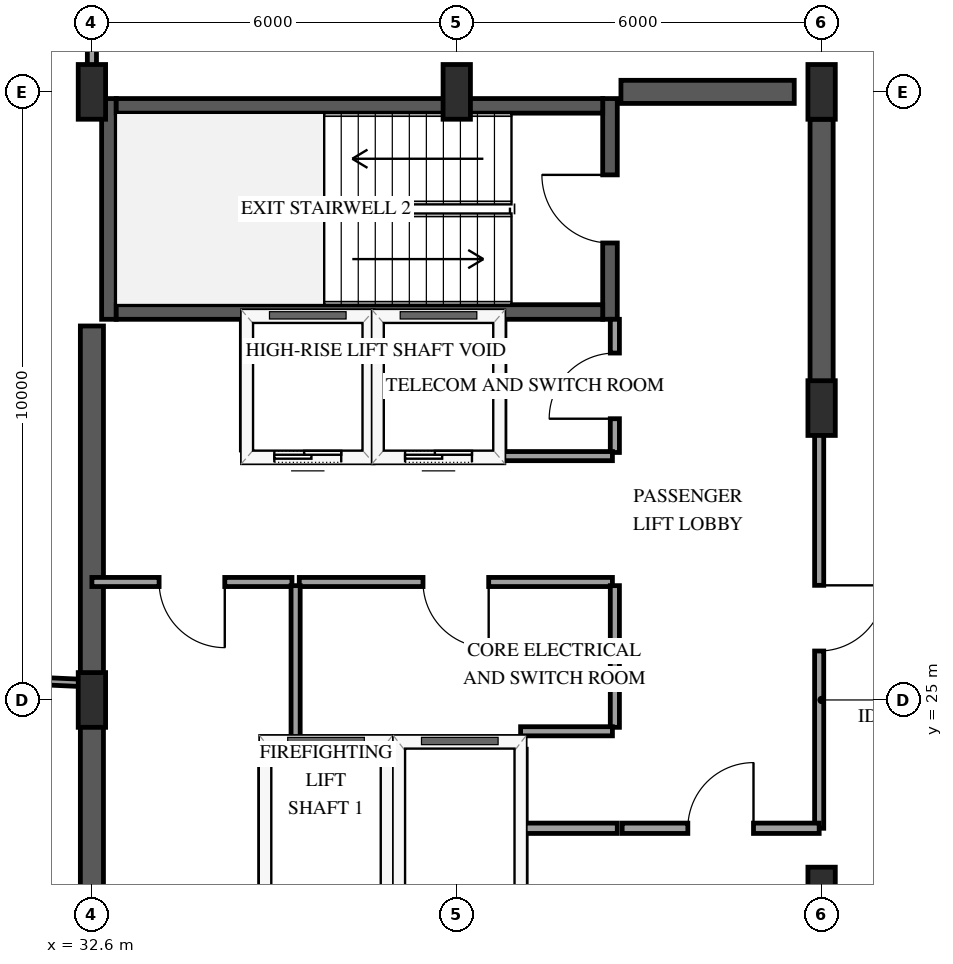
"""IFC4 building model, lengths in metres.
Left out: names, types, materials, properties, quantities, classifications, styles, units other than length and angle.
Written with IfcOpenShell. Run it as: python <this file> out.ifc"""

import sys

from ifc_helpers import new_model, si_unit, direction, frame, frame_2d, origin, origin_2d, place, context, subcontext, project, spatial, rectangle, extrude, element, fill, save


model = new_model("IFC4")
c1 = context("Model", 3, precision=1e-05, world=origin(), true_north=direction((0.0, 1.0)))
c2 = subcontext(c1, "Body", "Model", "MODEL_VIEW")
j1 = project(units=[si_unit("LENGTHUNIT", "METRE"), si_unit("PLANEANGLEUNIT", "RADIAN")], contexts=[c1])
p1 = place(None, origin())
s1 = spatial("IfcSite", under=j1, at=p1, CompositionType="ELEMENT")
p2 = place(p1, origin())
s2 = spatial("IfcBuilding", under=s1, at=p2, CompositionType="ELEMENT")
p3 = place(p2, frame((0.0, 0.0, 293.05)))
s3 = spatial("IfcBuildingStorey", under=s2, at=p3, CompositionType="ELEMENT", Elevation=293.05)
p4 = place(p3, frame((32.88, 31.26, 0.0), z_axis=(0.0, 0.0, 1.0), x_axis=(0.0, 1.0, 0.0)))
e1 = element("IfcWall", 1, at=p4, inside=s3, PredefinedType="SHEAR", context=c2, shape_type="SweptSolid", body=[
    extrude(rectangle(XDim=3.63, YDim=0.24, at=frame_2d((1.815, 0.0))), origin(), (0.0, 0.0, 1.0), 4.2),
])
p5 = place(p3, frame((41.12, 31.26, 0.0), z_axis=(0.0, 0.0, 1.0), x_axis=(0.0, 1.0, 0.0)))
e2 = element("IfcWall", 2, at=p5, inside=s3, PredefinedType="SHEAR", context=c2, shape_type="SweptSolid", body=[
    extrude(rectangle(XDim=3.63, YDim=0.24, at=frame_2d((1.815, 0.0))), origin(), (0.0, 0.0, 1.0), 4.2),
])
p6 = place(p5, frame((1.255, 0.0, 0.0)))
e3 = element("IfcOpeningElement", 3, at=p6, cuts=e2, PredefinedType="OPENING", context=c2, shape_type="SweptSolid", body=[
    extrude(rectangle(XDim=1.12, YDim=2.15, at=frame_2d((0.56, 1.075))), frame((0.0, 0.13, 0.0), z_axis=(0.0, -1.0, 0.0), x_axis=(1.0, 0.0, 0.0)), (0.0, 0.0, 1.0), 0.26),
])
for number, where, z_axis, x_axis in (
    (4, (33.0, 31.38, 0.0), (0.0, 0.0, 1.0), (1.0, 0.0, 0.0)),
    (5, (33.0, 34.77, 0.0), (0.0, 0.0, 1.0), (1.0, 0.0, 0.0)),
):
    element("IfcWall", number, at=place(p3, frame(where, z_axis=z_axis, x_axis=x_axis)), inside=s3, PredefinedType="SHEAR", context=c2, shape_type="SweptSolid", body=[
        extrude(rectangle(XDim=8.0, YDim=0.24, at=frame_2d((4.0, 0.0))), origin(), (0.0, 0.0, 1.0), 4.2),
    ])
p7 = place(p3, frame((32.6, 18.85, 0.0), z_axis=(0.0, 0.0, 1.0), x_axis=(0.0, 1.0, 0.0)))
e6 = element("IfcWall", 6, at=p7, inside=s3, PredefinedType="SHEAR", context=c2, shape_type="SweptSolid", body=[
    extrude(rectangle(XDim=12.3, YDim=0.38, at=frame_2d((6.15, 0.0))), origin(), (0.0, 0.0, 1.0), 4.2),
])
p8 = place(p3, frame((41.3, 35.0, 0.0), z_axis=(0.0, 0.0, 1.0), x_axis=(1.0, 0.0, 0.0)))
e7 = element("IfcWall", 7, at=p8, inside=s3, PredefinedType="SHEAR", context=c2, shape_type="SweptSolid", body=[
    extrude(rectangle(XDim=2.85, YDim=0.38, at=frame_2d((1.425, 0.0))), origin(), (0.0, 0.0, 1.0), 4.2),
])
p9 = place(p3, frame((44.6, 29.8, 0.0), z_axis=(0.0, 0.0, 1.0), x_axis=(0.0, 1.0, 0.0)))
e8 = element("IfcWall", 8, at=p9, inside=s3, PredefinedType="SHEAR", context=c2, shape_type="SweptSolid", body=[
    extrude(rectangle(XDim=4.75, YDim=0.38, at=frame_2d((2.375, 0.0))), origin(), (0.0, 0.0, 1.0), 4.2),
])
for number, where, z_axis, x_axis in (
    (9, (32.6, 25.0, -0.305), (0.0, 0.0, 1.0), (1.0, 0.0, 0.0)),
    (10, (32.6, 35.0, -0.305), (0.0, 0.0, 1.0), (1.0, 0.0, 0.0)),
    (11, (38.6, 35.0, -0.305), (0.0, 0.0, 1.0), (1.0, 0.0, 0.0)),
    (12, (44.6, 21.8, -0.305), (0.0, 0.0, 1.0), (1.0, 0.0, 0.0)),
    (13, (44.6, 29.8, -0.305), (0.0, 0.0, 1.0), (1.0, 0.0, 0.0)),
    (14, (44.6, 35.0, -0.305), (0.0, 0.0, 1.0), (1.0, 0.0, 0.0)),
):
    element("IfcColumn", number, at=place(p3, frame(where, z_axis=z_axis, x_axis=x_axis)), inside=s3, PredefinedType="PILASTER", context=c2, shape_type="SweptSolid", body=[
        extrude(rectangle(XDim=0.45, YDim=0.9, at=origin_2d()), origin(), (0.0, 0.0, 1.0), 4.505),
    ])
p10 = place(p3, frame((35.45, 24.3, 0.0), z_axis=(0.0, 0.0, 1.0), x_axis=(1.0, 0.0, 0.0)))
e15 = element("IfcWall", 15, at=p10, inside=s3, PredefinedType="SOLIDWALL", context=c2, shape_type="SweptSolid", body=[
    extrude(rectangle(XDim=2.0, YDim=0.185, at=frame_2d((1.0, 0.0))), origin(), (0.0, 0.0, 1.0), 3.895),
])
for number, where, z_axis, x_axis in (
    (16, (35.45, 21.81, 0.0), (0.0, 0.0, 1.0), (0.0, 1.0, 0.0)),
    (17, (37.45, 21.81, 0.0), (0.0, 0.0, 1.0), (0.0, 1.0, 0.0)),
):
    element("IfcWall", number, at=place(p3, frame(where, z_axis=z_axis, x_axis=x_axis)), inside=s3, PredefinedType="SOLIDWALL", context=c2, shape_type="SweptSolid", body=[
        extrude(rectangle(XDim=2.38, YDim=0.185, at=frame_2d((1.19, 0.0))), origin(), (0.0, 0.0, 1.0), 3.895),
    ])
p11 = place(p3, frame((37.65, 24.3, 0.0), z_axis=(0.0, 0.0, 1.0), x_axis=(1.0, 0.0, 0.0)))
e18 = element("IfcWall", 18, at=p11, inside=s3, PredefinedType="SOLIDWALL", context=c2, shape_type="SweptSolid", body=[
    extrude(rectangle(XDim=2.0, YDim=0.185, at=frame_2d((1.0, 0.0))), origin(), (0.0, 0.0, 1.0), 3.895),
])
p12 = place(p3, frame((39.65, 21.81, 0.0), z_axis=(0.0, 0.0, 1.0), x_axis=(0.0, 1.0, 0.0)))
e19 = element("IfcWall", 19, at=p12, inside=s3, PredefinedType="SOLIDWALL", context=c2, shape_type="SweptSolid", body=[
    extrude(rectangle(XDim=2.38, YDim=0.185, at=frame_2d((1.19, 0.0))), origin(), (0.0, 0.0, 1.0), 3.895),
])
p13 = place(p3, frame((35.15, 29.0, 0.0), z_axis=(0.0, 0.0, 1.0), x_axis=(1.0, 0.0, 0.0)))
e20 = element("IfcWall", 20, at=p13, inside=s3, PredefinedType="SOLIDWALL", context=c2, shape_type="SweptSolid", body=[
    extrude(rectangle(XDim=2.0, YDim=0.185, at=frame_2d((1.0, 0.0))), origin(), (0.0, 0.0, 1.0), 3.895),
])
p14 = place(p13, frame((0.45, 0.0, 0.0)))
e21 = element("IfcOpeningElement", 21, at=p14, cuts=e20, PredefinedType="OPENING", context=c2, shape_type="SweptSolid", body=[
    extrude(rectangle(XDim=1.1, YDim=2.15, at=frame_2d((0.55, 1.075))), frame((0.0, 0.103, 0.0), z_axis=(0.0, -1.0, 0.0), x_axis=(1.0, 0.0, 0.0)), (0.0, 0.0, 1.0), 0.205),
])
for number, where, z_axis, x_axis in (
    (22, (35.15, 29.11, 0.0), (0.0, 0.0, 1.0), (0.0, 1.0, 0.0)),
    (23, (37.15, 29.11, 0.0), (0.0, 0.0, 1.0), (0.0, 1.0, 0.0)),
):
    element("IfcWall", number, at=place(p3, frame(where, z_axis=z_axis, x_axis=x_axis)), inside=s3, PredefinedType="SOLIDWALL", context=c2, shape_type="SweptSolid", body=[
        extrude(rectangle(XDim=2.1, YDim=0.185, at=frame_2d((1.05, 0.0))), origin(), (0.0, 0.0, 1.0), 3.895),
    ])
p15 = place(p3, frame((37.3, 29.0, 0.0), z_axis=(0.0, 0.0, 1.0), x_axis=(1.0, 0.0, 0.0)))
e24 = element("IfcWall", 24, at=p15, inside=s3, PredefinedType="SOLIDWALL", context=c2, shape_type="SweptSolid", body=[
    extrude(rectangle(XDim=2.0, YDim=0.185, at=frame_2d((1.0, 0.0))), origin(), (0.0, 0.0, 1.0), 3.895),
])
p16 = place(p15, frame((0.45, 0.0, 0.0)))
e25 = element("IfcOpeningElement", 25, at=p16, cuts=e24, PredefinedType="OPENING", context=c2, shape_type="SweptSolid", body=[
    extrude(rectangle(XDim=1.1, YDim=2.15, at=frame_2d((0.55, 1.075))), frame((0.0, 0.103, 0.0), z_axis=(0.0, -1.0, 0.0), x_axis=(1.0, 0.0, 0.0)), (0.0, 0.0, 1.0), 0.205),
])
p17 = place(p3, frame((39.3, 29.11, 0.0), z_axis=(0.0, 0.0, 1.0), x_axis=(0.0, 1.0, 0.0)))
e26 = element("IfcWall", 26, at=p17, inside=s3, PredefinedType="SOLIDWALL", context=c2, shape_type="SweptSolid", body=[
    extrude(rectangle(XDim=2.1, YDim=0.185, at=frame_2d((1.05, 0.0))), origin(), (0.0, 0.0, 1.0), 3.895),
])
p18 = place(p3, frame((32.527, 25.276, 0.0), z_axis=(0.0, 0.0, 1.0), x_axis=(-0.998965703411, 0.045470027593, 0.0)))
e27 = element("IfcWall", 27, at=p18, inside=s3, PredefinedType="PARTITIONING", context=c2, shape_type="SweptSolid", body=[
    extrude(rectangle(XDim=7.458, YDim=0.12, at=frame_2d((3.729, 0.0))), origin(), (0.0, 0.0, 1.0), 3.19),
])
p19 = place(p3, frame((44.56, 29.8, 0.0), z_axis=(0.0, 0.0, 1.0), x_axis=(0.0, -1.0, 0.0)))
e28 = element("IfcWall", 28, at=p19, inside=s3, PredefinedType="PARTITIONING", context=c2, shape_type="SweptSolid", body=[
    extrude(rectangle(XDim=6.91, YDim=0.15, at=frame_2d((3.455, 0.0))), origin(), (0.0, 0.0, 1.0), 2.935),
])
p20 = place(p19, frame((2.915, 0.0, 0.0)))
e29 = element("IfcOpeningElement", 29, at=p20, cuts=e28, PredefinedType="OPENING", context=c2, shape_type="SweptSolid", body=[
    extrude(rectangle(XDim=1.08, YDim=2.15, at=frame_2d((0.54, 1.075))), frame((0.0, 0.085, 0.0), z_axis=(0.0, -1.0, 0.0), x_axis=(1.0, 0.0, 0.0)), (0.0, 0.0, 1.0), 0.17),
])
p21 = place(p3, frame((41.16, 26.94, 0.0), z_axis=(0.0, 0.0, 1.0), x_axis=(-1.0, 0.0, 0.0)))
e30 = element("IfcWall", 30, at=p21, inside=s3, PredefinedType="PARTITIONING", context=c2, shape_type="SweptSolid", body=[
    extrude(rectangle(XDim=5.15, YDim=0.15, at=frame_2d((2.575, 0.0))), origin(), (0.0, 0.0, 1.0), 3.895),
])
p22 = place(p21, frame((2.035, 0.0, 0.0)))
e31 = element("IfcOpeningElement", 31, at=p22, cuts=e30, PredefinedType="OPENING", context=c2, shape_type="SweptSolid", body=[
    extrude(rectangle(XDim=1.08, YDim=2.15, at=frame_2d((0.54, 1.075))), frame((0.0, 0.085, 0.0), z_axis=(0.0, -1.0, 0.0), x_axis=(1.0, 0.0, 0.0)), (0.0, 0.0, 1.0), 0.17),
])
p23 = place(p3, frame((35.89, 26.94, 0.0), z_axis=(0.0, 0.0, 1.0), x_axis=(-1.0, 0.0, 0.0)))
e32 = element("IfcWall", 32, at=p23, inside=s3, PredefinedType="PARTITIONING", context=c2, shape_type="SweptSolid", body=[
    extrude(rectangle(XDim=3.29, YDim=0.15, at=frame_2d((1.645, 0.0))), origin(), (0.0, 0.0, 1.0), 3.895),
])
p24 = place(p23, frame((1.105, 0.0, 0.0)))
e33 = element("IfcOpeningElement", 33, at=p24, cuts=e32, PredefinedType="OPENING", context=c2, shape_type="SweptSolid", body=[
    extrude(rectangle(XDim=1.08, YDim=2.15, at=frame_2d((0.54, 1.075))), frame((0.0, 0.085, 0.0), z_axis=(0.0, -1.0, 0.0), x_axis=(1.0, 0.0, 0.0)), (0.0, 0.0, 1.0), 0.17),
])
p25 = place(p3, frame((41.32, 22.89, 0.0), z_axis=(0.0, 0.0, 1.0), x_axis=(1.0, 0.0, 0.0)))
e34 = element("IfcWall", 34, at=p25, inside=s3, PredefinedType="PARTITIONING", context=c2, shape_type="SweptSolid", body=[
    extrude(rectangle(XDim=3.24, YDim=0.17, at=frame_2d((1.62, 0.0))), origin(), (0.0, 0.0, 1.0), 3.895),
])
p26 = place(p25, frame((1.08, 0.0, 0.0)))
e35 = element("IfcOpeningElement", 35, at=p26, cuts=e34, PredefinedType="OPENING", context=c2, shape_type="SweptSolid", body=[
    extrude(rectangle(XDim=1.08, YDim=2.15, at=frame_2d((0.54, 1.075))), frame((0.0, 0.095, 0.0), z_axis=(0.0, -1.0, 0.0), x_axis=(1.0, 0.0, 0.0)), (0.0, 0.0, 1.0), 0.19),
])
p27 = place(p3, frame((35.95, 26.88, 0.0), z_axis=(0.0, 0.0, 1.0), x_axis=(0.0, -1.0, 0.0)))
e36 = element("IfcWall", 36, at=p27, inside=s3, PredefinedType="PARTITIONING", context=c2, shape_type="SweptSolid", body=[
    extrude(rectangle(XDim=2.58, YDim=0.15, at=frame_2d((1.29, 0.0))), origin(), (0.0, 0.0, 1.0), 3.895),
])
p28 = place(p3, frame((41.2, 24.55, 0.0), z_axis=(0.0, 0.0, 1.0), x_axis=(0.0, 1.0, 0.0)))
e37 = element("IfcWall", 37, at=p28, inside=s3, PredefinedType="PARTITIONING", context=c2, shape_type="SweptSolid", body=[
    extrude(rectangle(XDim=2.33, YDim=0.15, at=frame_2d((1.165, 0.0))), origin(), (0.0, 0.0, 1.0), 3.895),
])
p29 = place(p3, frame((41.2, 29.07, 0.0), z_axis=(0.0, 0.0, 1.0), x_axis=(0.0, 1.0, 0.0)))
e38 = element("IfcWall", 38, at=p29, inside=s3, PredefinedType="PARTITIONING", context=c2, shape_type="SweptSolid", body=[
    extrude(rectangle(XDim=2.19, YDim=0.15, at=frame_2d((1.095, 0.0))), origin(), (0.0, 0.0, 1.0), 3.895),
])
p30 = place(p29, frame((0.555, 0.0, 0.0)))
e39 = element("IfcOpeningElement", 39, at=p30, cuts=e38, PredefinedType="OPENING", context=c2, shape_type="SweptSolid", body=[
    extrude(rectangle(XDim=1.08, YDim=2.15, at=frame_2d((0.54, 1.075))), frame((0.0, 0.085, 0.0), z_axis=(0.0, -1.0, 0.0), x_axis=(1.0, 0.0, 0.0)), (0.0, 0.0, 1.0), 0.17),
])
p31 = place(p3, frame((39.3, 29.01, 0.0), z_axis=(0.0, 0.0, 1.0), x_axis=(1.0, 0.0, 0.0)))
e40 = element("IfcWall", 40, at=p31, inside=s3, PredefinedType="PARTITIONING", context=c2, shape_type="SweptSolid", body=[
    extrude(rectangle(XDim=1.86, YDim=0.15, at=frame_2d((0.93, 0.0))), origin(), (0.0, 0.0, 1.0), 3.895),
])
p32 = place(p3, frame((39.72, 22.89, 0.0), z_axis=(0.0, 0.0, 1.0), x_axis=(1.0, 0.0, 0.0)))
e41 = element("IfcWall", 41, at=p32, inside=s3, PredefinedType="PARTITIONING", context=c2, shape_type="SweptSolid", body=[
    extrude(rectangle(XDim=1.52, YDim=0.17, at=frame_2d((0.76, 0.0))), origin(), (0.0, 0.0, 1.0), 3.895),
])
p33 = place(p3, frame((32.6, 35.12, 0.0), z_axis=(0.0, 0.0, 1.0), x_axis=(0.0, 1.0, 0.0)))
e42 = element("IfcWall", 42, at=p33, inside=s3, PredefinedType="PARTITIONING", context=c2, shape_type="SweptSolid", body=[
    extrude(rectangle(XDim=1.51, YDim=0.15, at=frame_2d((0.755, 0.0))), origin(), (0.0, 0.0, 1.0), 3.895),
])
p34 = place(p3, frame((39.65, 24.485, 0.0), z_axis=(0.0, 0.0, 1.0), x_axis=(1.0, 0.0, 0.0)))
e43 = element("IfcWall", 43, at=p34, inside=s3, PredefinedType="PARTITIONING", context=c2, shape_type="SweptSolid", body=[
    extrude(rectangle(XDim=1.51, YDim=0.15, at=frame_2d((0.755, 0.0))), origin(), (0.0, 0.0, 1.0), 3.895),
])
p35 = place(p14, origin())
e44 = element("IfcDoor", 44, at=p35, inside=s3, OperationType="SLIDING_TO_LEFT", PredefinedType="DOOR", context=c2, shape_type="SweptSolid", body=[
    extrude(rectangle(XDim=1.1, YDim=2.15, at=frame_2d((0.55, 1.075))), frame((0.0, 0.025, 0.0), z_axis=(0.0, -1.0, 0.0), x_axis=(1.0, 0.0, 0.0)), (0.0, 0.0, 1.0), 0.05),
])
fill(e21, e44)
p36 = place(p16, origin())
e45 = element("IfcDoor", 45, at=p36, inside=s3, OperationType="SLIDING_TO_LEFT", PredefinedType="DOOR", context=c2, shape_type="SweptSolid", body=[
    extrude(rectangle(XDim=1.1, YDim=2.15, at=frame_2d((0.55, 1.075))), frame((0.0, 0.025, 0.0), z_axis=(0.0, -1.0, 0.0), x_axis=(1.0, 0.0, 0.0)), (0.0, 0.0, 1.0), 0.05),
])
fill(e25, e45)
p37 = place(p6, origin())
e46 = element("IfcDoor", 46, at=p37, inside=s3, OperationType="SINGLE_SWING_RIGHT", PredefinedType="DOOR", context=c2, shape_type="SweptSolid", body=[
    extrude(rectangle(XDim=1.12, YDim=2.15, at=frame_2d((0.56, 1.075))), frame((0.0, 0.025, 0.0), z_axis=(0.0, -1.0, 0.0), x_axis=(1.0, 0.0, 0.0)), (0.0, 0.0, 1.0), 0.05),
])
fill(e3, e46)
p38 = place(p20, origin())
e47 = element("IfcDoor", 47, at=p38, inside=s3, OperationType="SINGLE_SWING_LEFT", PredefinedType="DOOR", context=c2, shape_type="SweptSolid", body=[
    extrude(rectangle(XDim=1.08, YDim=2.15, at=frame_2d((0.54, 1.075))), frame((0.0, 0.025, 0.0), z_axis=(0.0, -1.0, 0.0), x_axis=(1.0, 0.0, 0.0)), (0.0, 0.0, 1.0), 0.05),
])
fill(e29, e47)
p39 = place(p22, origin())
e48 = element("IfcDoor", 48, at=p39, inside=s3, OperationType="SINGLE_SWING_LEFT", PredefinedType="DOOR", context=c2, shape_type="SweptSolid", body=[
    extrude(rectangle(XDim=1.08, YDim=2.15, at=frame_2d((0.54, 1.075))), frame((0.0, 0.025, 0.0), z_axis=(0.0, -1.0, 0.0), x_axis=(1.0, 0.0, 0.0)), (0.0, 0.0, 1.0), 0.05),
])
fill(e31, e48)
p40 = place(p24, origin())
e49 = element("IfcDoor", 49, at=p40, inside=s3, OperationType="SINGLE_SWING_LEFT", PredefinedType="DOOR", context=c2, shape_type="SweptSolid", body=[
    extrude(rectangle(XDim=1.08, YDim=2.15, at=frame_2d((0.54, 1.075))), frame((0.0, 0.025, 0.0), z_axis=(0.0, -1.0, 0.0), x_axis=(1.0, 0.0, 0.0)), (0.0, 0.0, 1.0), 0.05),
])
fill(e33, e49)
p41 = place(p26, origin())
e50 = element("IfcDoor", 50, at=p41, inside=s3, OperationType="SINGLE_SWING_RIGHT", PredefinedType="DOOR", context=c2, shape_type="SweptSolid", body=[
    extrude(rectangle(XDim=1.08, YDim=2.15, at=frame_2d((0.54, 1.075))), frame((0.0, 0.025, 0.0), z_axis=(0.0, -1.0, 0.0), x_axis=(1.0, 0.0, 0.0)), (0.0, 0.0, 1.0), 0.05),
])
fill(e35, e50)
p42 = place(p30, origin())
e51 = element("IfcDoor", 51, at=p42, inside=s3, OperationType="SINGLE_SWING_LEFT", PredefinedType="DOOR", context=c2, shape_type="SweptSolid", body=[
    extrude(rectangle(XDim=1.08, YDim=2.15, at=frame_2d((0.54, 1.075))), frame((0.0, 0.025, 0.0), z_axis=(0.0, -1.0, 0.0), x_axis=(1.0, 0.0, 0.0)), (0.0, 0.0, 1.0), 0.05),
])
fill(e39, e51)
save(model, sys.argv[1])
